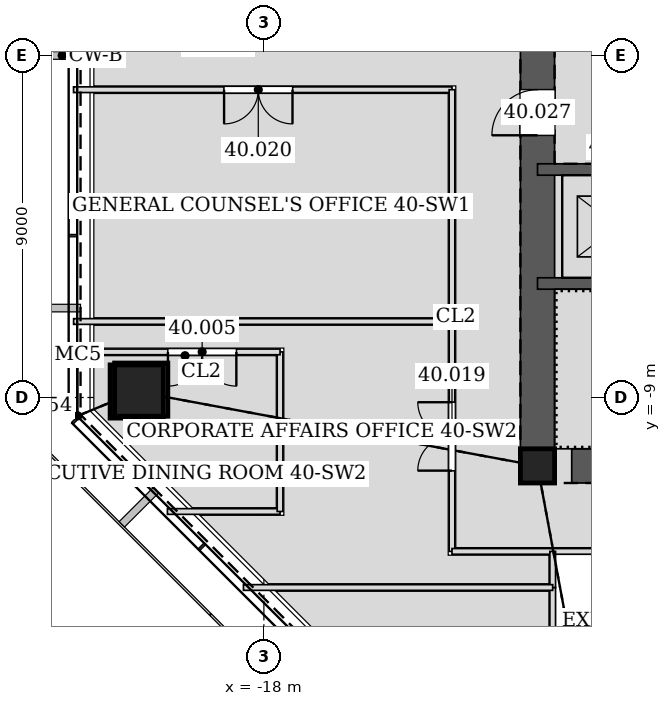
"""IFC4 building model, lengths in metres.
Left out: names, types, materials, properties, quantities, classifications, styles, units other than length and angle.
Written with IfcOpenShell. Run it as: python <this file> out.ifc"""

import sys

from ifc_helpers import new_model, si_unit, direction, frame, frame_2d, origin, origin_2d, place, context, subcontext, project, spatial, rectangle, hollow_rectangle, extrude, element, fill, save


model = new_model("IFC4")
c1 = context("Model", 3, precision=1e-05, world=origin(), true_north=direction((0.0, 1.0)))
c2 = subcontext(c1, "Body", "Model", "MODEL_VIEW")
j1 = project(units=[si_unit("LENGTHUNIT", "METRE"), si_unit("PLANEANGLEUNIT", "RADIAN")], contexts=[c1])
p1 = place(None, origin())
s1 = spatial("IfcSite", under=j1, at=p1, CompositionType="ELEMENT")
p2 = place(p1, origin())
s2 = spatial("IfcBuilding", under=s1, at=p2, CompositionType="ELEMENT")
p3 = place(p2, frame((0.0, 0.0, 176.4)))
s3 = spatial("IfcBuildingStorey", under=s2, at=p3, CompositionType="ELEMENT", Elevation=176.4)
p4 = place(p3, frame((-21.346, -8.842, 0.0), z_axis=(0.028294087032, 0.011735945751, 0.999530746009), x_axis=(-0.383133442967, 0.923693003589, 0.0)))
e1 = element("IfcColumn", 1, at=p4, inside=s3, PredefinedType="COLUMN", context=c2, shape_type="SweptSolid", body=[
    extrude(hollow_rectangle(XDim=1.4, YDim=1.4, WallThickness=0.065, at=origin_2d()), origin(), (0.0, 0.0, 1.0), 4.202),
])
p5 = place(p3, frame((-22.225, 0.0, 0.0), z_axis=(0.02829603574, 0.0, 0.999599587015), x_axis=(0.0, 1.0, 0.0)))
e2 = element("IfcColumn", 2, at=p5, inside=s3, PredefinedType="COLUMN", context=c2, shape_type="SweptSolid", body=[
    extrude(hollow_rectangle(XDim=0.5, YDim=0.5, WallThickness=0.025, at=origin_2d()), origin(), (0.0, 0.0, 1.0), 4.202),
])
p6 = place(p3, frame((-10.8, -10.8, 0.0), z_axis=(0.0, 0.0, 1.0), x_axis=(1.0, 0.0, 0.0)))
e3 = element("IfcColumn", 3, at=p6, inside=s3, PredefinedType="COLUMN", context=c2, shape_type="SweptSolid", body=[
    extrude(hollow_rectangle(XDim=0.9, YDim=0.9, WallThickness=0.06, at=origin_2d()), origin(), (0.0, 0.0, 1.0), 4.2),
])
p7 = place(p3, frame((-10.8, -10.8, 0.0), z_axis=(0.0, 0.0, 1.0), x_axis=(1.0, 0.0, 0.0)))
e4 = element("IfcWall", 4, at=p7, inside=s3, PredefinedType="SOLIDWALL", context=c2, shape_type="SweptSolid", body=[
    extrude(rectangle(XDim=21.6, YDim=0.9, at=frame_2d((10.8, 0.0))), origin(), (0.0, 0.0, 1.0), 4.2),
])
p8 = place(p7, frame((10.05, 0.0, 0.0)))
e5 = element("IfcOpeningElement", 5, at=p8, cuts=e4, PredefinedType="OPENING", context=c2, shape_type="SweptSolid", body=[
    extrude(rectangle(XDim=1.5, YDim=2.1, at=frame_2d((0.75, 1.05))), frame((0.0, 0.46, 0.0), z_axis=(0.0, -1.0, 0.0), x_axis=(1.0, 0.0, 0.0)), (0.0, 0.0, 1.0), 0.92),
])
p9 = place(p7, frame((17.1, 0.0, 0.0)))
e6 = element("IfcOpeningElement", 6, at=p9, cuts=e4, PredefinedType="OPENING", context=c2, shape_type="SweptSolid", body=[
    extrude(rectangle(XDim=0.9, YDim=2.1, at=frame_2d((0.45, 1.05))), frame((0.0, 0.46, 0.0), z_axis=(0.0, -1.0, 0.0), x_axis=(1.0, 0.0, 0.0)), (0.0, 0.0, 1.0), 0.92),
])
p10 = place(p3, frame((-10.8, 10.8, 0.0), z_axis=(0.0, 0.0, 1.0), x_axis=(0.0, -1.0, 0.0)))
e7 = element("IfcWall", 7, at=p10, inside=s3, PredefinedType="SOLIDWALL", context=c2, shape_type="SweptSolid", body=[
    extrude(rectangle(XDim=21.6, YDim=0.9, at=frame_2d((10.8, 0.0))), origin(), (0.0, 0.0, 1.0), 4.2),
])
p11 = place(p10, frame((8.7, 0.0, 0.0)))
e8 = element("IfcOpeningElement", 8, at=p11, cuts=e7, PredefinedType="OPENING", context=c2, shape_type="SweptSolid", body=[
    extrude(rectangle(XDim=1.2, YDim=2.1, at=frame_2d((0.6, 1.05))), frame((0.0, 0.46, 0.0), z_axis=(0.0, -1.0, 0.0), x_axis=(1.0, 0.0, 0.0)), (0.0, 0.0, 1.0), 0.92),
])
p12 = place(p10, frame((11.7, 0.0, 0.0)))
e9 = element("IfcOpeningElement", 9, at=p12, cuts=e7, PredefinedType="OPENING", context=c2, shape_type="SweptSolid", body=[
    extrude(rectangle(XDim=1.2, YDim=2.1, at=frame_2d((0.6, 1.05))), frame((0.0, 0.46, 0.0), z_axis=(0.0, -1.0, 0.0), x_axis=(1.0, 0.0, 0.0)), (0.0, 0.0, 1.0), 0.92),
])
p13 = place(p3, frame((-10.8, -3.0, 0.0), z_axis=(0.0, 0.0, 1.0), x_axis=(1.0, 0.0, 0.0)))
e10 = element("IfcWall", 10, at=p13, inside=s3, PredefinedType="SOLIDWALL", context=c2, shape_type="SweptSolid", body=[
    extrude(rectangle(XDim=21.6, YDim=0.3, at=frame_2d((10.8, 0.0))), origin(), (0.0, 0.0, 1.0), 4.2),
])
p14 = place(p13, frame((1.55, 0.0, 0.0)))
e11 = element("IfcOpeningElement", 11, at=p14, cuts=e10, PredefinedType="OPENING", context=c2, shape_type="SweptSolid", body=[
    extrude(rectangle(XDim=1.1, YDim=2.1, at=frame_2d((0.55, 1.05))), frame((0.0, 0.16, 0.0), z_axis=(0.0, -1.0, 0.0), x_axis=(1.0, 0.0, 0.0)), (0.0, 0.0, 1.0), 0.32),
])
p15 = place(p13, frame((4.45, 0.0, 0.0)))
e12 = element("IfcOpeningElement", 12, at=p15, cuts=e10, PredefinedType="OPENING", context=c2, shape_type="SweptSolid", body=[
    extrude(rectangle(XDim=1.1, YDim=2.1, at=frame_2d((0.55, 1.05))), frame((0.0, 0.16, 0.0), z_axis=(0.0, -1.0, 0.0), x_axis=(1.0, 0.0, 0.0)), (0.0, 0.0, 1.0), 0.32),
])
p16 = place(p13, frame((7.35, 0.0, 0.0)))
e13 = element("IfcOpeningElement", 13, at=p16, cuts=e10, PredefinedType="OPENING", context=c2, shape_type="SweptSolid", body=[
    extrude(rectangle(XDim=1.1, YDim=2.1, at=frame_2d((0.55, 1.05))), frame((0.0, 0.16, 0.0), z_axis=(0.0, -1.0, 0.0), x_axis=(1.0, 0.0, 0.0)), (0.0, 0.0, 1.0), 0.32),
])
p17 = place(p13, frame((13.15, 0.0, 0.0)))
e14 = element("IfcOpeningElement", 14, at=p17, cuts=e10, PredefinedType="OPENING", context=c2, shape_type="SweptSolid", body=[
    extrude(rectangle(XDim=1.1, YDim=2.1, at=frame_2d((0.55, 1.05))), frame((0.0, 0.16, 0.0), z_axis=(0.0, -1.0, 0.0), x_axis=(1.0, 0.0, 0.0)), (0.0, 0.0, 1.0), 0.32),
])
p18 = place(p3, frame((-10.8, -6.0, 0.0), z_axis=(0.0, 0.0, 1.0), x_axis=(1.0, 0.0, 0.0)))
e15 = element("IfcWall", 15, at=p18, inside=s3, PredefinedType="SOLIDWALL", context=c2, shape_type="SweptSolid", body=[
    extrude(rectangle(XDim=21.6, YDim=0.3, at=frame_2d((10.8, 0.0))), origin(), (0.0, 0.0, 1.0), 4.2),
])
p19 = place(p18, frame((10.25, 0.0, 0.0)))
e16 = element("IfcOpeningElement", 16, at=p19, cuts=e15, PredefinedType="OPENING", context=c2, shape_type="SweptSolid", body=[
    extrude(rectangle(XDim=1.1, YDim=2.1, at=frame_2d((0.55, 1.05))), frame((0.0, 0.16, 0.0), z_axis=(0.0, -1.0, 0.0), x_axis=(1.0, 0.0, 0.0)), (0.0, 0.0, 1.0), 0.32),
])
p20 = place(p3, frame((-10.401, -13.05, 0.0), z_axis=(0.0, 0.0, 1.0), x_axis=(1.0, 0.0, 0.0)))
e17 = element("IfcWall", 17, at=p20, inside=s3, PredefinedType="PARTITIONING", context=c2, shape_type="SweptSolid", body=[
    extrude(rectangle(XDim=6.802, YDim=0.15, at=frame_2d((3.401, 0.0))), origin(), (0.0, 0.0, 1.0), 3.098),
])
p21 = place(p20, frame((2.901, 0.0, 0.0)))
e18 = element("IfcOpeningElement", 18, at=p21, cuts=e17, PredefinedType="OPENING", context=c2, shape_type="SweptSolid", body=[
    extrude(rectangle(XDim=1.0, YDim=2.1, at=frame_2d((0.5, 1.05))), frame((0.0, 0.085, 0.0), z_axis=(0.0, -1.0, 0.0), x_axis=(1.0, 0.0, 0.0)), (0.0, 0.0, 1.0), 0.17),
])
p22 = place(p3, frame((-13.05, -6.999, 0.0), z_axis=(0.0, 0.0, 1.0), x_axis=(0.0, -1.0, 0.0)))
e19 = element("IfcWall", 19, at=p22, inside=s3, PredefinedType="PARTITIONING", context=c2, shape_type="SweptSolid", body=[
    extrude(rectangle(XDim=6.051, YDim=0.15, at=frame_2d((3.025, 0.0))), origin(), (0.0, 0.0, 1.0), 3.098),
])
p23 = place(p22, frame((2.125, 0.0, 0.0)))
e20 = element("IfcOpeningElement", 20, at=p23, cuts=e19, PredefinedType="OPENING", context=c2, shape_type="SweptSolid", body=[
    extrude(rectangle(XDim=1.8, YDim=2.4, at=frame_2d((0.9, 1.2))), frame((0.0, 0.085, 0.0), z_axis=(0.0, -1.0, 0.0), x_axis=(1.0, 0.0, 0.0)), (0.0, 0.0, 1.0), 0.17),
])
p24 = place(p3, frame((-13.05, -13.05, 0.0), z_axis=(0.0, 0.0, 1.0), x_axis=(1.0, 0.0, 0.0)))
e21 = element("IfcWall", 21, at=p24, inside=s3, PredefinedType="PARTITIONING", context=c2, shape_type="SweptSolid", body=[
    extrude(rectangle(XDim=2.651, YDim=0.15, at=frame_2d((1.326, 0.0))), origin(), (0.0, 0.0, 1.0), 3.098),
])
p25 = place(p3, frame((-23.009, -0.9, 0.0), z_axis=(0.0, 0.0, 1.0), x_axis=(1.0, 0.0, 0.0)))
e22 = element("IfcWall", 22, at=p25, inside=s3, PredefinedType="PARTITIONING", context=c2, shape_type="SweptSolid", body=[
    extrude(rectangle(XDim=9.958, YDim=0.15, at=frame_2d((4.979, 0.0))), origin(), (0.0, 0.0, 1.0), 3.426),
])
p26 = place(p25, frame((3.961, 0.0, 0.0)))
e23 = element("IfcOpeningElement", 23, at=p26, cuts=e22, PredefinedType="OPENING", context=c2, shape_type="SweptSolid", body=[
    extrude(rectangle(XDim=1.8, YDim=2.4, at=frame_2d((0.9, 1.2))), frame((0.0, 0.085, 0.0), z_axis=(0.0, -1.0, 0.0), x_axis=(1.0, 0.0, 0.0)), (0.0, 0.0, 1.0), 0.17),
])
p27 = place(p3, frame((-13.05, -0.9, 0.0), z_axis=(0.0, 0.0, 1.0), x_axis=(0.0, -1.0, 0.0)))
e24 = element("IfcWall", 24, at=p27, inside=s3, PredefinedType="PARTITIONING", context=c2, shape_type="SweptSolid", body=[
    extrude(rectangle(XDim=6.101, YDim=0.15, at=frame_2d((3.051, 0.0))), origin(), (0.0, 0.0, 1.0), 4.035),
])
p28 = place(p3, frame((-20.538, -12.0, 0.0), z_axis=(0.0, 0.0, 1.0), x_axis=(1.0, 0.0, 0.0)))
e25 = element("IfcWall", 25, at=p28, inside=s3, PredefinedType="PARTITIONING", context=c2, shape_type="SweptSolid", body=[
    extrude(rectangle(XDim=2.963, YDim=0.15, at=frame_2d((1.481, 0.0))), origin(), (0.0, 0.0, 1.0), 3.499),
])
p29 = place(p3, frame((-17.575, -12.0, 0.0), z_axis=(0.0, 0.0, 1.0), x_axis=(0.0, 1.0, 0.0)))
e26 = element("IfcWall", 26, at=p29, inside=s3, PredefinedType="PARTITIONING", context=c2, shape_type="SweptSolid", body=[
    extrude(rectangle(XDim=4.2, YDim=0.15, at=frame_2d((2.1, 0.0))), origin(), (0.0, 0.0, 1.0), 3.098),
])
p30 = place(p3, frame((-17.575, -7.8, 0.0), z_axis=(0.0, 0.0, 1.0), x_axis=(-1.0, 0.0, 0.0)))
e27 = element("IfcWall", 27, at=p30, inside=s3, PredefinedType="PARTITIONING", context=c2, shape_type="SweptSolid", body=[
    extrude(rectangle(XDim=5.434, YDim=0.15, at=frame_2d((2.717, 0.0))), origin(), (0.0, 0.0, 1.0), 3.492),
])
p31 = place(p30, frame((1.15, 0.0, 0.0)))
e28 = element("IfcOpeningElement", 28, at=p31, cuts=e27, PredefinedType="OPENING", context=c2, shape_type="SweptSolid", body=[
    extrude(rectangle(XDim=1.8, YDim=2.4, at=frame_2d((0.9, 1.2))), frame((0.0, 0.085, 0.0), z_axis=(0.0, -1.0, 0.0), x_axis=(1.0, 0.0, 0.0)), (0.0, 0.0, 1.0), 0.17),
])
p32 = place(p3, frame((-10.4, -13.999, 0.0), z_axis=(0.0, 0.0, 1.0), x_axis=(0.0, -1.0, 0.0)))
e29 = element("IfcWall", 29, at=p32, inside=s3, PredefinedType="PARTITIONING", context=c2, shape_type="SweptSolid", body=[
    extrude(rectangle(XDim=1.501, YDim=0.15, at=frame_2d((0.75, 0.0))), origin(), (0.0, 0.0, 1.0), 3.098),
])
p33 = place(p3, frame((-10.4, -13.05, 0.0), z_axis=(0.0, 0.0, 1.0), x_axis=(0.0, -1.0, 0.0)))
e30 = element("IfcWall", 30, at=p33, inside=s3, PredefinedType="PARTITIONING", context=c2, shape_type="SweptSolid", body=[
    extrude(rectangle(XDim=0.951, YDim=0.15, at=frame_2d((0.476, 0.0))), origin(), (0.0, 0.0, 1.0), 3.098),
])
p34 = place(p3, frame((-10.4, -14.0, 0.0), z_axis=(0.0, 0.0, 1.0), x_axis=(-1.0, 0.0, 0.0)))
e31 = element("IfcWall", 31, at=p34, inside=s3, PredefinedType="PARTITIONING", context=c2, shape_type="SweptSolid", body=[
    extrude(rectangle(XDim=8.138, YDim=0.15, at=frame_2d((4.069, 0.0))), origin(), (0.0, 0.0, 1.0), 3.342),
])
p35 = place(p3, frame((-13.05, -7.0, 0.0), z_axis=(0.0, 0.0, 1.0), x_axis=(-1.0, 0.0, 0.0)))
e32 = element("IfcWall", 32, at=p35, inside=s3, PredefinedType="PARTITIONING", context=c2, shape_type="SweptSolid", body=[
    extrude(rectangle(XDim=9.957, YDim=0.15, at=frame_2d((4.978, 0.0))), origin(), (0.0, 0.0, 1.0), 3.426),
])
p36 = place(p31, origin())
e33 = element("IfcDoor", 33, at=p36, inside=s3, OperationType="DOUBLE_DOOR_SINGLE_SWING", PredefinedType="DOOR", context=c2, shape_type="SweptSolid", body=[
    extrude(rectangle(XDim=1.8, YDim=2.4, at=frame_2d((0.9, 1.2))), frame((0.0, 0.025, 0.0), z_axis=(0.0, -1.0, 0.0), x_axis=(1.0, 0.0, 0.0)), (0.0, 0.0, 1.0), 0.05),
])
fill(e28, e33)
p37 = place(p23, frame((1.8, 0.0, 0.0), z_axis=(0.0, 0.0, 1.0), x_axis=(-1.0, 0.0, 0.0)))
e34 = element("IfcDoor", 34, at=p37, inside=s3, OperationType="DOUBLE_DOOR_SINGLE_SWING", PredefinedType="DOOR", context=c2, shape_type="SweptSolid", body=[
    extrude(rectangle(XDim=1.8, YDim=2.4, at=frame_2d((0.9, 1.2))), frame((0.0, 0.025, 0.0), z_axis=(0.0, -1.0, 0.0), x_axis=(1.0, 0.0, 0.0)), (0.0, 0.0, 1.0), 0.05),
])
fill(e20, e34)
p38 = place(p26, frame((1.8, 0.0, 0.0), z_axis=(0.0, 0.0, 1.0), x_axis=(-1.0, 0.0, 0.0)))
e35 = element("IfcDoor", 35, at=p38, inside=s3, OperationType="DOUBLE_DOOR_SINGLE_SWING", PredefinedType="DOOR", context=c2, shape_type="SweptSolid", body=[
    extrude(rectangle(XDim=1.8, YDim=2.4, at=frame_2d((0.9, 1.2))), frame((0.0, 0.025, 0.0), z_axis=(0.0, -1.0, 0.0), x_axis=(1.0, 0.0, 0.0)), (0.0, 0.0, 1.0), 0.05),
])
fill(e23, e35)
p39 = place(p12, frame((1.2, 0.0, 0.0), z_axis=(0.0, 0.0, 1.0), x_axis=(-1.0, 0.0, 0.0)))
e36 = element("IfcDoor", 36, at=p39, inside=s3, OperationType="SINGLE_SWING_LEFT", PredefinedType="DOOR", context=c2, shape_type="SweptSolid", body=[
    extrude(rectangle(XDim=1.2, YDim=2.1, at=frame_2d((0.6, 1.05))), frame((0.0, 0.025, 0.0), z_axis=(0.0, -1.0, 0.0), x_axis=(1.0, 0.0, 0.0)), (0.0, 0.0, 1.0), 0.05),
])
fill(e9, e36)
save(model, sys.argv[1])
